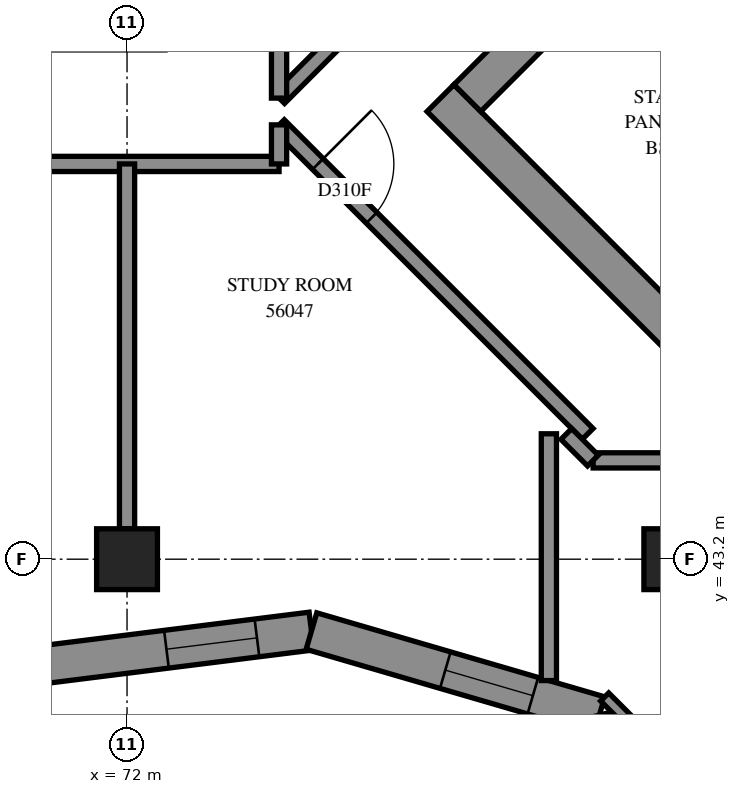
"""IFC4 building model, lengths in metres.
Left out: names, types, materials, properties, quantities, classifications, styles, units other than length and angle.
Written with IfcOpenShell. Run it as: python <this file> out.ifc"""

import sys

from ifc_helpers import new_model, si_unit, direction, frame, frame_2d, origin, origin_2d, place, context, subcontext, project, spatial, polyline, rectangle, outline, extrude, element, fill, save


model = new_model("IFC4")
c1 = context("Model", 3, precision=1e-05, world=origin(), true_north=direction((0.0, 1.0)))
c2 = subcontext(c1, "Body", "Model", "MODEL_VIEW")
j1 = project(units=[si_unit("LENGTHUNIT", "METRE"), si_unit("PLANEANGLEUNIT", "RADIAN")], contexts=[c1])
p1 = place(None, origin())
s1 = spatial("IfcSite", under=j1, at=p1, CompositionType="ELEMENT")
p2 = place(p1, origin())
s2 = spatial("IfcBuilding", under=s1, at=p2, CompositionType="ELEMENT")
p3 = place(p2, frame((0.0, 0.0, 206.6)))
s3 = spatial("IfcBuildingStorey", under=s2, at=p3, CompositionType="ELEMENT", Elevation=206.6)
for number, where, z_axis, x_axis in (
    (1, (72.0, 43.2, 0.0), (0.0, 0.0, 1.0), (1.0, 0.0, 0.0)),
    (2, (79.2, 43.2, 0.0), (0.0, 0.0, 1.0), (1.0, 0.0, 0.0)),
):
    element("IfcColumn", number, at=place(p3, frame(where, z_axis=z_axis, x_axis=x_axis)), inside=s3, PredefinedType="COLUMN", context=c2, shape_type="SweptSolid", body=[
        extrude(rectangle(XDim=0.8, YDim=0.8, at=origin_2d()), origin(), (0.0, 0.0, 1.0), 3.1),
    ])
p4 = place(p3, frame((76.124, 49.267, -0.3), z_axis=(0.0, 0.0, 1.0), x_axis=(0.7071067812, -0.7071067812, 0.0)))
e3 = element("IfcWall", 3, at=p4, inside=s3, PredefinedType="SHEAR", context=c2, shape_type="SweptSolid", body=[
    extrude(rectangle(XDim=15.4, YDim=0.5, at=frame_2d((7.7, 0.0))), origin(), (0.0, 0.0, 1.0), 2.7),
])
p5 = place(p3, frame((76.478, 49.267, -0.3), z_axis=(0.0, 0.0, 1.0), x_axis=(0.7071067812, 0.7071067812, 0.0)))
e4 = element("IfcWall", 4, at=p5, inside=s3, PredefinedType="SHEAR", context=c2, shape_type="SweptSolid", body=[
    extrude(rectangle(XDim=14.4, YDim=0.5, at=frame_2d((7.2, 0.0))), origin(), (0.0, 0.0, 1.0), 2.7),
])
p6 = place(p5, frame((4.55, 0.0, 0.3)))
e5 = element("IfcOpeningElement", 5, at=p6, cuts=e4, PredefinedType="OPENING", context=c2, shape_type="SweptSolid", body=[
    extrude(rectangle(XDim=1.1, YDim=2.1, at=frame_2d((0.55, 1.05))), frame((0.0, 0.26, 0.0), z_axis=(0.0, -1.0, 0.0), x_axis=(1.0, 0.0, 0.0)), (0.0, 0.0, 1.0), 0.52),
])
p7 = place(p5, frame((11.35, 0.0, 0.3)))
e6 = element("IfcOpeningElement", 6, at=p7, cuts=e4, PredefinedType="OPENING", context=c2, shape_type="SweptSolid", body=[
    extrude(rectangle(XDim=1.1, YDim=2.1, at=frame_2d((0.55, 1.05))), frame((0.0, 0.26, 0.0), z_axis=(0.0, -1.0, 0.0), x_axis=(1.0, 0.0, 0.0)), (0.0, 0.0, 1.0), 0.52),
])
p8 = place(p3, frame((78.988, 51.423, 0.0), z_axis=(0.0, 0.0, 1.0), x_axis=(0.7071067812, -0.7071067812, 0.0)))
e7 = element("IfcWall", 7, at=p8, inside=s3, PredefinedType="SOLIDWALL", context=c2, shape_type="SweptSolid", body=[
    extrude(rectangle(XDim=14.4, YDim=0.3, at=frame_2d((7.2, 0.0))), origin(), (0.0, 0.0, 1.0), 3.1),
])
p9 = place(p8, frame((1.35, 0.0, 0.0)))
e8 = element("IfcOpeningElement", 8, at=p9, cuts=e7, PredefinedType="OPENING", context=c2, shape_type="SweptSolid", body=[
    extrude(rectangle(XDim=0.9, YDim=2.1, at=frame_2d((0.45, 1.05))), frame((0.0, 0.16, 0.0), z_axis=(0.0, -1.0, 0.0), x_axis=(1.0, 0.0, 0.0)), (0.0, 0.0, 1.0), 0.32),
])
p10 = place(p8, frame((4.95, 0.0, 0.0)))
e9 = element("IfcOpeningElement", 9, at=p10, cuts=e7, PredefinedType="OPENING", context=c2, shape_type="SweptSolid", body=[
    extrude(rectangle(XDim=0.9, YDim=2.1, at=frame_2d((0.45, 1.05))), frame((0.0, 0.16, 0.0), z_axis=(0.0, -1.0, 0.0), x_axis=(1.0, 0.0, 0.0)), (0.0, 0.0, 1.0), 0.32),
])
p11 = place(p8, frame((8.55, 0.0, 0.0)))
e10 = element("IfcOpeningElement", 10, at=p11, cuts=e7, PredefinedType="OPENING", context=c2, shape_type="SweptSolid", body=[
    extrude(rectangle(XDim=0.9, YDim=2.1, at=frame_2d((0.45, 1.05))), frame((0.0, 0.16, 0.0), z_axis=(0.0, -1.0, 0.0), x_axis=(1.0, 0.0, 0.0)), (0.0, 0.0, 1.0), 0.32),
])
p12 = place(p8, frame((12.05, 0.0, 0.0)))
e11 = element("IfcOpeningElement", 11, at=p12, cuts=e7, PredefinedType="OPENING", context=c2, shape_type="SweptSolid", body=[
    extrude(rectangle(XDim=1.1, YDim=2.1, at=frame_2d((0.55, 1.05))), frame((0.0, 0.16, 0.0), z_axis=(0.0, -1.0, 0.0), x_axis=(1.0, 0.0, 0.0)), (0.0, 0.0, 1.0), 0.32),
])
p13 = place(p3, frame((70.805, 41.801, 0.0), z_axis=(0.0, 0.0, 1.0), x_axis=(0.9922491844, 0.1242640575, 0.0)))
e12 = element("IfcWall", 12, at=p13, inside=s3, PredefinedType="SOLIDWALL", context=c2, shape_type="SweptSolid", body=[
    extrude(outline(polyline([(-0.031, -0.25), (3.598, -0.25), (3.701, 0.25), (0.031, 0.25), (-0.031, -0.25)])), origin(), (0.0, 0.0, 1.0), 3.1),
])
p14 = place(p13, frame((1.727, 0.0, 0.45)))
e13 = element("IfcOpeningElement", 13, at=p14, cuts=e12, PredefinedType="OPENING", context=c2, shape_type="SweptSolid", body=[
    extrude(rectangle(XDim=1.2, YDim=2.5, at=frame_2d((0.6, 1.25))), frame((0.0, 0.26, 0.0), z_axis=(0.0, -1.0, 0.0), x_axis=(1.0, 0.0, 0.0)), (0.0, 0.0, 1.0), 0.52),
])
p15 = place(p3, frame((74.426, 42.255, 0.0), z_axis=(0.0, 0.0, 1.0), x_axis=(0.9599457695, -0.2801858662, 0.0)))
e14 = element("IfcWall", 14, at=p15, inside=s3, PredefinedType="SOLIDWALL", context=c2, shape_type="SweptSolid", body=[
    extrude(outline(polyline([(0.052, -0.25), (3.803, -0.25), (4.089, 0.25), (-0.052, 0.25), (0.052, -0.25)])), origin(), (0.0, 0.0, 1.0), 3.1),
])
p16 = place(p15, frame((1.834, 0.0, 0.45)))
e15 = element("IfcOpeningElement", 15, at=p16, cuts=e14, PredefinedType="OPENING", context=c2, shape_type="SweptSolid", body=[
    extrude(rectangle(XDim=1.2, YDim=2.5, at=frame_2d((0.6, 1.25))), frame((0.0, 0.26, 0.0), z_axis=(0.0, -1.0, 0.0), x_axis=(1.0, 0.0, 0.0)), (0.0, 0.0, 1.0), 0.52),
])
p17 = place(p3, frame((78.214, 41.149, 0.0), z_axis=(0.0, 0.0, 1.0), x_axis=(0.2448559355, -0.9695594726, 0.0)))
e16 = element("IfcWall", 16, at=p17, inside=s3, PredefinedType="SOLIDWALL", context=c2, shape_type="SweptSolid", body=[
    extrude(outline(polyline([(0.143, -0.25), (4.827, -0.25), (4.541, 0.25), (-0.143, 0.25), (0.143, -0.25)])), origin(), (0.0, 0.0, 1.0), 3.1),
])
p18 = place(p17, frame((2.019, 0.0, 0.45)))
e17 = element("IfcOpeningElement", 17, at=p18, cuts=e16, PredefinedType="OPENING", context=c2, shape_type="SweptSolid", body=[
    extrude(rectangle(XDim=1.2, YDim=2.5, at=frame_2d((0.6, 1.25))), frame((0.0, 0.26, 0.0), z_axis=(0.0, -1.0, 0.0), x_axis=(1.0, 0.0, 0.0)), (0.0, 0.0, 1.0), 0.52),
])
p19 = place(p3, frame((55.6, 48.4, 0.0), z_axis=(0.0, 0.0, 1.0), x_axis=(1.0, 0.0, 0.0)))
e18 = element("IfcWall", 18, at=p19, inside=s3, PredefinedType="PARTITIONING", context=c2, shape_type="SweptSolid", body=[
    extrude(rectangle(XDim=18.4, YDim=0.2, at=frame_2d((9.2, 0.0))), origin(), (0.0, 0.0, 1.0), 3.1),
])
p20 = place(p19, frame((5.862, 0.0, 0.0)))
e19 = element("IfcOpeningElement", 19, at=p20, cuts=e18, PredefinedType="OPENING", context=c2, shape_type="SweptSolid", body=[
    extrude(rectangle(XDim=1.0, YDim=2.1, at=frame_2d((0.5, 1.05))), frame((0.0, 0.11, 0.0), z_axis=(0.0, -1.0, 0.0), x_axis=(1.0, 0.0, 0.0)), (0.0, 0.0, 1.0), 0.22),
])
p21 = place(p19, frame((13.099, 0.0, 0.0)))
e20 = element("IfcOpeningElement", 20, at=p21, cuts=e18, PredefinedType="OPENING", context=c2, shape_type="SweptSolid", body=[
    extrude(rectangle(XDim=0.9, YDim=2.1, at=frame_2d((0.45, 1.05))), frame((0.0, 0.11, 0.0), z_axis=(0.0, -1.0, 0.0), x_axis=(1.0, 0.0, 0.0)), (0.0, 0.0, 1.0), 0.22),
])
p22 = place(p3, frame((73.999, 48.911, 0.0), z_axis=(0.0, 0.0, 1.0), x_axis=(0.7071067812, -0.7071067812, 0.0)))
e21 = element("IfcWall", 21, at=p22, inside=s3, PredefinedType="PARTITIONING", context=c2, shape_type="SweptSolid", body=[
    extrude(rectangle(XDim=5.745, YDim=0.2, at=frame_2d((2.872, 0.0))), origin(), (0.0, 0.0, 1.0), 3.1),
])
p23 = place(p22, frame((0.724, 0.0, 0.0)))
e22 = element("IfcOpeningElement", 22, at=p23, cuts=e21, PredefinedType="OPENING", context=c2, shape_type="SweptSolid", body=[
    extrude(rectangle(XDim=1.0, YDim=2.1, at=frame_2d((0.5, 1.05))), frame((0.0, 0.11, 0.0), z_axis=(0.0, -1.0, 0.0), x_axis=(1.0, 0.0, 0.0)), (0.0, 0.0, 1.0), 0.22),
])
p24 = place(p3, frame((74.001, 49.267, 0.0), z_axis=(0.0, 0.0, 1.0), x_axis=(0.7071067812, 0.7071067812, 0.0)))
e23 = element("IfcWall", 23, at=p24, inside=s3, PredefinedType="PARTITIONING", context=c2, shape_type="SweptSolid", body=[
    extrude(rectangle(XDim=5.278, YDim=0.2, at=frame_2d((2.639, 0.0))), origin(), (0.0, 0.0, 1.0), 3.1),
])
p25 = place(p3, frame((72.0, 43.6, 0.0), z_axis=(0.0, 0.0, 1.0), x_axis=(0.0, 1.0, 0.0)))
e24 = element("IfcWall", 24, at=p25, inside=s3, PredefinedType="PARTITIONING", context=c2, shape_type="SweptSolid", body=[
    extrude(rectangle(XDim=4.8, YDim=0.2, at=frame_2d((2.4, 0.0))), origin(), (0.0, 0.0, 1.0), 3.1),
])
p26 = place(p3, frame((74.0, 49.266, 0.0), z_axis=(0.0, 0.0, 1.0), x_axis=(0.0, 1.0, 0.0)))
e25 = element("IfcWall", 25, at=p26, inside=s3, PredefinedType="PARTITIONING", context=c2, shape_type="SweptSolid", body=[
    extrude(rectangle(XDim=3.734, YDim=0.2, at=frame_2d((1.867, 0.0))), origin(), (0.0, 0.0, 1.0), 3.1),
])
p27 = place(p3, frame((77.55, 41.603, 0.0), z_axis=(0.0, 0.0, 1.0), x_axis=(0.0, 1.0, 0.0)))
e26 = element("IfcWall", 26, at=p27, inside=s3, PredefinedType="PARTITIONING", context=c2, shape_type="SweptSolid", body=[
    extrude(rectangle(XDim=3.247, YDim=0.2, at=frame_2d((1.623, 0.0))), origin(), (0.0, 0.0, 1.0), 3.1),
])
p28 = place(p3, frame((78.284, 41.388, 0.0), z_axis=(0.0, 0.0, 1.0), x_axis=(0.7066067914, -0.7076064177, 0.0)))
e27 = element("IfcWall", 27, at=p28, inside=s3, PredefinedType="PARTITIONING", context=c2, shape_type="SweptSolid", body=[
    extrude(rectangle(XDim=3.101, YDim=0.15, at=frame_2d((1.551, 0.0))), origin(), (0.0, 0.0, 1.0), 3.1),
])
p29 = place(p3, frame((78.132, 44.5, 0.0), z_axis=(0.0, 0.0, 1.0), x_axis=(1.0, 0.0, 0.0)))
e28 = element("IfcWall", 28, at=p29, inside=s3, PredefinedType="PARTITIONING", context=c2, shape_type="SweptSolid", body=[
    extrude(rectangle(XDim=2.292, YDim=0.2, at=frame_2d((1.146, 0.0))), origin(), (0.0, 0.0, 1.0), 3.1),
])
p30 = place(p3, frame((78.728, 40.134, 0.0), z_axis=(0.0, 0.0, 1.0), x_axis=(0.7070818237, 0.7071317377, 0.0)))
e29 = element("IfcWall", 29, at=p30, inside=s3, PredefinedType="PARTITIONING", context=c2, shape_type="SweptSolid", body=[
    extrude(rectangle(XDim=2.003, YDim=0.15, at=frame_2d((1.002, 0.0))), origin(), (0.0, 0.0, 1.0), 3.1),
])
p31 = place(p3, frame((74.0, 48.4, 0.0), z_axis=(0.0, 0.0, 1.0), x_axis=(0.0, 1.0, 0.0)))
e30 = element("IfcWall", 30, at=p31, inside=s3, PredefinedType="PARTITIONING", context=c2, shape_type="SweptSolid", body=[
    extrude(rectangle(XDim=0.514, YDim=0.2, at=frame_2d((0.257, 0.0))), origin(), (0.0, 0.0, 1.0), 3.1),
])
p32 = place(p3, frame((77.779, 44.847, 0.0), z_axis=(0.0, 0.0, 1.0), x_axis=(0.7071067812, -0.7071067812, 0.0)))
e31 = element("IfcWall", 31, at=p32, inside=s3, PredefinedType="PARTITIONING", context=c2, shape_type="SweptSolid", body=[
    extrude(rectangle(XDim=0.495, YDim=0.2, at=frame_2d((0.247, 0.0))), origin(), (0.0, 0.0, 1.0), 3.1),
])
p33 = place(p14, origin())
e32 = element("IfcWindow", 32, at=p33, inside=s3, PartitioningType="SINGLE_PANEL", PredefinedType="WINDOW", context=c2, shape_type="SweptSolid", body=[
    extrude(rectangle(XDim=1.2, YDim=2.5, at=frame_2d((0.6, 1.25))), frame((0.0, 0.18, 0.0), z_axis=(0.0, -1.0, 0.0), x_axis=(1.0, 0.0, 0.0)), (0.0, 0.0, 1.0), 0.06),
])
fill(e13, e32)
p34 = place(p16, origin())
e33 = element("IfcWindow", 33, at=p34, inside=s3, PartitioningType="SINGLE_PANEL", PredefinedType="WINDOW", context=c2, shape_type="SweptSolid", body=[
    extrude(rectangle(XDim=1.2, YDim=2.5, at=frame_2d((0.6, 1.25))), frame((0.0, 0.18, 0.0), z_axis=(0.0, -1.0, 0.0), x_axis=(1.0, 0.0, 0.0)), (0.0, 0.0, 1.0), 0.06),
])
fill(e15, e33)
p35 = place(p23, origin())
e34 = element("IfcDoor", 34, at=p35, inside=s3, OperationType="SINGLE_SWING_LEFT", PredefinedType="DOOR", context=c2, shape_type="SweptSolid", body=[
    extrude(rectangle(XDim=1.0, YDim=2.1, at=frame_2d((0.5, 1.05))), frame((0.0, 0.025, 0.0), z_axis=(0.0, -1.0, 0.0), x_axis=(1.0, 0.0, 0.0)), (0.0, 0.0, 1.0), 0.05),
])
fill(e22, e34)
save(model, sys.argv[1])
